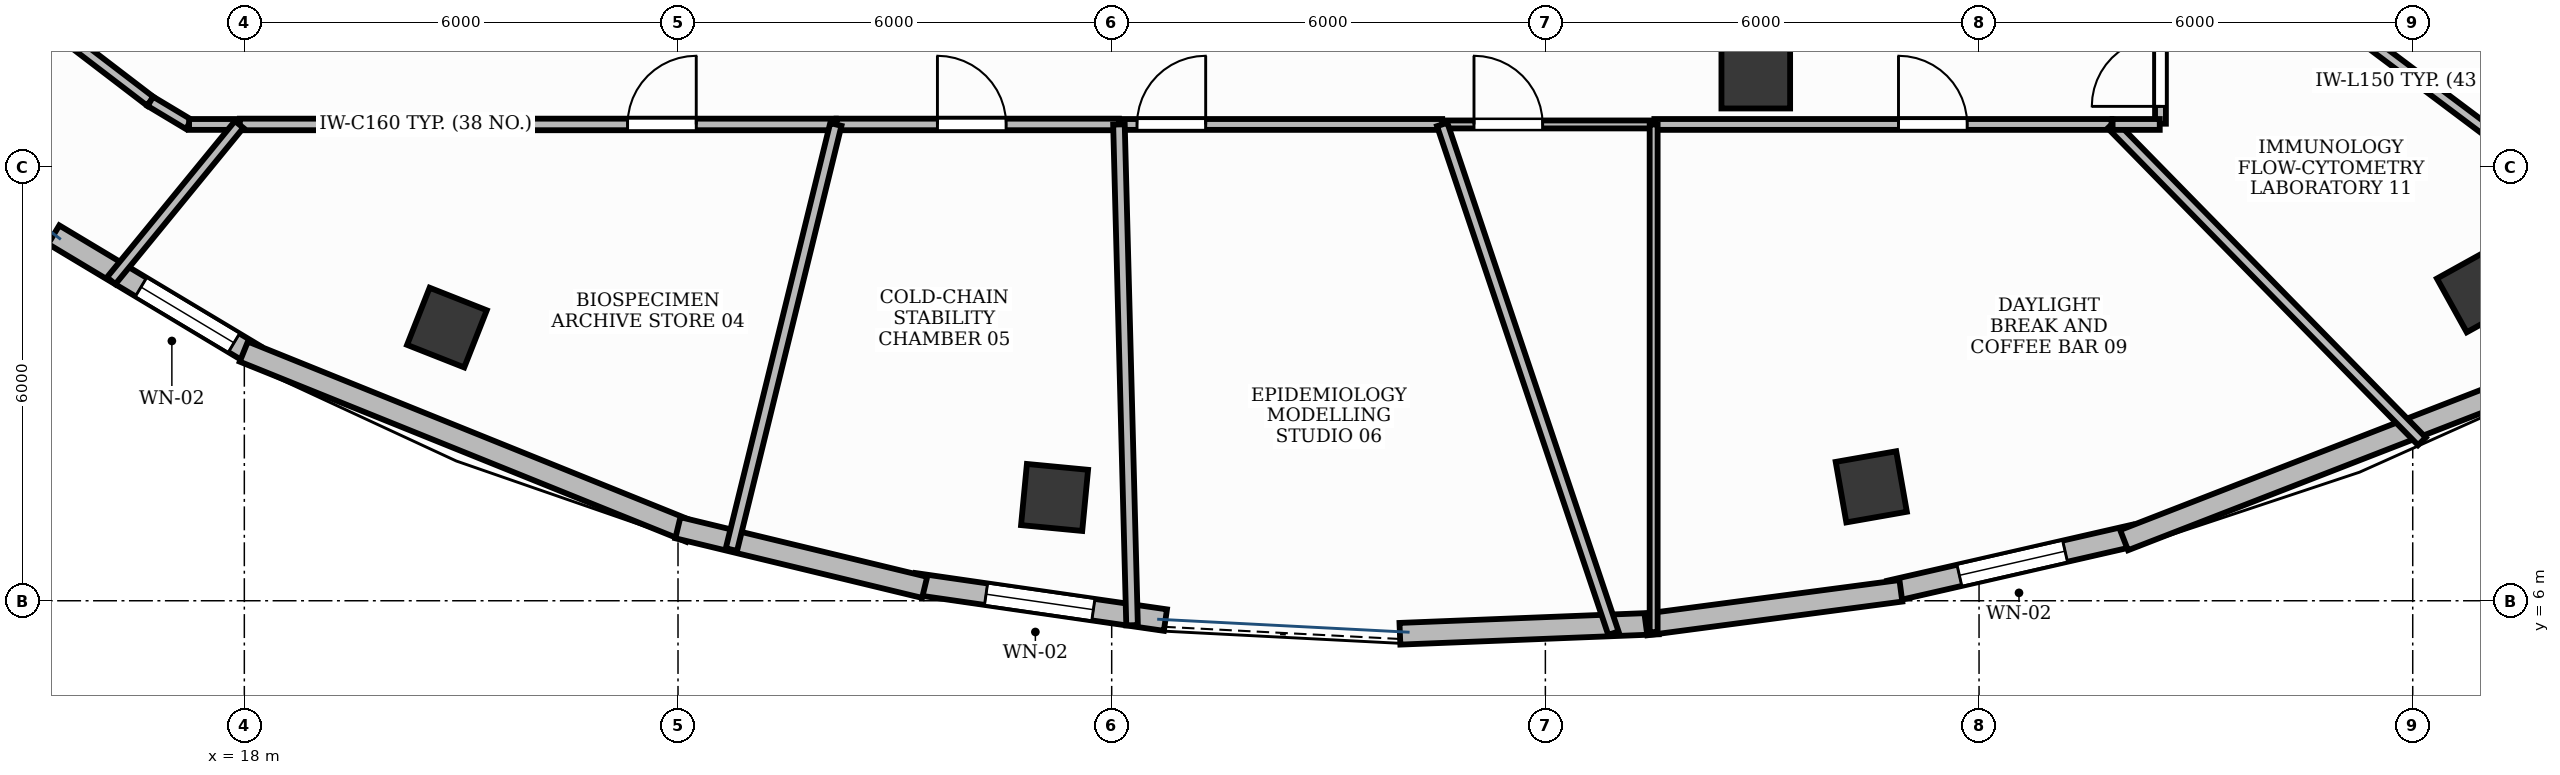
"""IFC4 building model, lengths in metres.
Left out: names, types, materials, properties, quantities, classifications, styles, units other than length and angle.
Written with IfcOpenShell. Run it as: python <this file> out.ifc"""

import sys

from ifc_helpers import new_model, si_unit, direction, frame, frame_2d, origin, origin_2d, place, context, subcontext, project, spatial, rectangle, extrude, element, fill, save


model = new_model("IFC4")
c1 = context("Model", 3, precision=1e-05, world=origin(), true_north=direction((0.0, 1.0)))
c2 = subcontext(c1, "Body", "Model", "MODEL_VIEW")
j1 = project(units=[si_unit("LENGTHUNIT", "METRE"), si_unit("PLANEANGLEUNIT", "RADIAN")], contexts=[c1])
p1 = place(None, origin())
s1 = spatial("IfcSite", under=j1, at=p1, CompositionType="ELEMENT")
p2 = place(p1, origin())
s2 = spatial("IfcBuilding", under=s1, at=p2, CompositionType="ELEMENT")
p3 = place(p2, frame((0.0, 0.0, 252.0)))
s3 = spatial("IfcBuildingStorey", under=s2, at=p3, CompositionType="ELEMENT", Elevation=252.0)
for number, where, z_axis, x_axis in (
    (1, (20.803, 9.78, -0.0), (0.0, 0.0, 1.0), (-0.93, 0.367, 0.0)),
    (2, (29.21, 7.429, -0.0), (0.0, 0.0, 1.0), (-0.995, 0.095, 0.0)),
    (3, (40.509, 7.576, -0.0), (0.0, 0.0, 1.0), (0.985, 0.173, 0.0)),
):
    element("IfcColumn", number, at=place(p3, frame(where, z_axis=z_axis, x_axis=x_axis)), inside=s3, PredefinedType="COLUMN", context=c2, shape_type="SweptSolid", body=[
        extrude(rectangle(XDim=0.85, YDim=0.85, at=origin_2d()), origin(), (0.0, 0.0, 1.0), 3.901),
    ])
p4 = place(p3, frame((38.911, 13.286, -0.0), z_axis=(0.0, 0.0, 1.0), x_axis=(1.0, 0.0, 0.0)))
e4 = element("IfcColumn", 4, at=p4, inside=s3, PredefinedType="COLUMN", context=c2, shape_type="SweptSolid", body=[
    extrude(rectangle(XDim=0.95, YDim=0.95, at=origin_2d()), origin(), (0.0, 0.0, 1.0), 3.901),
])
p5 = place(p3, frame((48.913, 10.292, -0.0), z_axis=(0.0, 0.0, 1.0), x_axis=(0.874535078577, 0.484962262797, 0.0)))
e5 = element("IfcColumn", 5, at=p5, inside=s3, PredefinedType="COLUMN", context=c2, shape_type="SweptSolid", body=[
    extrude(rectangle(XDim=0.85, YDim=0.85, at=origin_2d()), origin(), (0.0, 0.0, 1.0), 3.901),
])
p6 = place(p3, frame((15.363, 11.065, 0.0), z_axis=(0.0, 0.0, 1.0), x_axis=(0.857526080841, -0.514440492844, 0.0)))
e6 = element("IfcWall", 6, at=p6, inside=s3, PredefinedType="STANDARD", context=c2, shape_type="SweptSolid", body=[
    extrude(rectangle(XDim=3.249, YDim=0.3, at=frame_2d((1.624, 0.0))), origin(), (0.0, 0.0, 1.0), 3.9),
])
p7 = place(p6, frame((1.408, 0.0, 0.95)))
e7 = element("IfcOpeningElement", 7, at=p7, cuts=e6, PredefinedType="OPENING", context=c2, shape_type="SweptSolid", body=[
    extrude(rectangle(XDim=1.5, YDim=1.8, at=frame_2d((0.75, 0.9))), frame((0.0, 0.165, 0.0), z_axis=(0.0, -1.0, 0.0), x_axis=(1.0, 0.0, 0.0)), (0.0, 0.0, 1.0), 0.33),
])
p8 = place(p3, frame((27.265, 6.235, 0.0), z_axis=(0.0, 0.0, 1.0), x_axis=(0.989727373885, -0.14296756759, 0.0)))
e8 = element("IfcWall", 8, at=p8, inside=s3, PredefinedType="STANDARD", context=c2, shape_type="SweptSolid", body=[
    extrude(rectangle(XDim=3.514, YDim=0.3, at=frame_2d((1.757, 0.0))), origin(), (0.0, 0.0, 1.0), 3.9),
])
p9 = place(p8, frame((1.007, 0.0, 0.95)))
e9 = element("IfcOpeningElement", 9, at=p9, cuts=e8, PredefinedType="OPENING", context=c2, shape_type="SweptSolid", body=[
    extrude(rectangle(XDim=1.5, YDim=1.8, at=frame_2d((0.75, 0.9))), frame((0.0, 0.165, 0.0), z_axis=(0.0, -1.0, 0.0), x_axis=(1.0, 0.0, 0.0)), (0.0, 0.0, 1.0), 0.33),
])
p10 = place(p3, frame((40.763, 6.131, 0.0), z_axis=(0.0, 0.0, 1.0), x_axis=(0.974814062394, 0.223019155589, 0.0)))
e10 = element("IfcWall", 10, at=p10, inside=s3, PredefinedType="STANDARD", context=c2, shape_type="SweptSolid", body=[
    extrude(rectangle(XDim=3.479, YDim=0.3, at=frame_2d((1.74, 0.0))), origin(), (0.0, 0.0, 1.0), 3.9),
])
p11 = place(p10, frame((0.99, 0.0, 0.95)))
e11 = element("IfcOpeningElement", 11, at=p11, cuts=e10, PredefinedType="OPENING", context=c2, shape_type="SweptSolid", body=[
    extrude(rectangle(XDim=1.5, YDim=1.8, at=frame_2d((0.75, 0.9))), frame((0.0, 0.165, 0.0), z_axis=(0.0, -1.0, 0.0), x_axis=(1.0, 0.0, 0.0)), (0.0, 0.0, 1.0), 0.33),
])
p12 = place(p3, frame((17.993, 9.447, 0.0), z_axis=(0.0, 0.0, 1.0), x_axis=(0.927372969182, -0.374138177725, 0.0)))
e12 = element("IfcWall", 12, at=p12, inside=s3, PredefinedType="STANDARD", context=c2, shape_type="SweptSolid", body=[
    extrude(rectangle(XDim=6.66, YDim=0.3, at=frame_2d((3.33, 0.0))), origin(), (0.0, 0.0, 1.0), 3.47),
])
p13 = place(p3, frame((23.998, 7.01, 0.0), z_axis=(0.0, 0.0, 1.0), x_axis=(0.972025869784, -0.23487381393, 0.0)))
e13 = element("IfcWall", 13, at=p13, inside=s3, PredefinedType="STANDARD", context=c2, shape_type="SweptSolid", body=[
    extrude(rectangle(XDim=3.512, YDim=0.3, at=frame_2d((1.756, 0.0))), origin(), (0.0, 0.0, 1.0), 3.9),
])
p14 = place(p3, frame((33.988, 5.543, 0.0), z_axis=(0.0, 0.0, 1.0), x_axis=(0.999208461954, 0.039780014567, 0.0)))
e14 = element("IfcWall", 14, at=p14, inside=s3, PredefinedType="STANDARD", context=c2, shape_type="SweptSolid", body=[
    extrude(rectangle(XDim=3.578, YDim=0.3, at=frame_2d((1.789, 0.0))), origin(), (0.0, 0.0, 1.0), 3.9),
])
p15 = place(p3, frame((37.391, 5.671, 0.0), z_axis=(0.0, 0.0, 1.0), x_axis=(0.991358046751, 0.131183928672, 0.0)))
e15 = element("IfcWall", 15, at=p15, inside=s3, PredefinedType="STANDARD", context=c2, shape_type="SweptSolid", body=[
    extrude(rectangle(XDim=3.558, YDim=0.3, at=frame_2d((1.779, 0.0))), origin(), (0.0, 0.0, 1.0), 3.9),
])
p16 = place(p3, frame((44.007, 6.839, 0.0), z_axis=(0.0, 0.0, 1.0), x_axis=(0.932143156112, 0.362089956383, 0.0)))
e16 = element("IfcWall", 16, at=p16, inside=s3, PredefinedType="STANDARD", context=c2, shape_type="SweptSolid", body=[
    extrude(rectangle(XDim=6.68, YDim=0.3, at=frame_2d((3.34, 0.0))), origin(), (0.0, 0.0, 1.0), 3.9),
])
p17 = place(p3, frame((17.938, 12.59, 0.0), z_axis=(0.0, 0.0, 1.0), x_axis=(1.0, 0.0, 0.0)))
e17 = element("IfcWall", 17, at=p17, inside=s3, PredefinedType="PARTITIONING", context=c2, shape_type="SweptSolid", body=[
    extrude(rectangle(XDim=8.246, YDim=0.16, at=frame_2d((4.123, 0.0))), origin(), (0.0, 0.0, 1.0), 2.91),
])
p18 = place(p17, frame((5.364, 0.0, 0.0)))
e18 = element("IfcOpeningElement", 18, at=p18, cuts=e17, PredefinedType="OPENING", context=c2, shape_type="SweptSolid", body=[
    extrude(rectangle(XDim=0.95, YDim=2.15, at=frame_2d((0.475, 1.075))), frame((0.0, 0.095, 0.0), z_axis=(0.0, -1.0, 0.0), x_axis=(1.0, 0.0, 0.0)), (0.0, 0.0, 1.0), 0.19),
])
p19 = place(p3, frame((26.194, 12.59, 0.0), z_axis=(0.0, 0.0, 1.0), x_axis=(1.0, 0.0, 0.0)))
e19 = element("IfcWall", 19, at=p19, inside=s3, PredefinedType="PARTITIONING", context=c2, shape_type="SweptSolid", body=[
    extrude(rectangle(XDim=3.907, YDim=0.16, at=frame_2d((1.953, 0.0))), origin(), (0.0, 0.0, 1.0), 2.91),
])
p20 = place(p19, frame((1.396, 0.0, 0.0)))
e20 = element("IfcOpeningElement", 20, at=p20, cuts=e19, PredefinedType="OPENING", context=c2, shape_type="SweptSolid", body=[
    extrude(rectangle(XDim=0.95, YDim=2.15, at=frame_2d((0.475, 1.075))), frame((0.0, 0.095, 0.0), z_axis=(0.0, -1.0, 0.0), x_axis=(1.0, 0.0, 0.0)), (0.0, 0.0, 1.0), 0.19),
])
p21 = place(p3, frame((30.11, 12.59, 0.0), z_axis=(0.0, 0.0, 1.0), x_axis=(1.0, 0.0, 0.0)))
e21 = element("IfcWall", 21, at=p21, inside=s3, PredefinedType="PARTITIONING", context=c2, shape_type="SweptSolid", body=[
    extrude(rectangle(XDim=4.462, YDim=0.15, at=frame_2d((2.231, 0.0))), origin(), (0.0, 0.0, 1.0), 2.91),
])
p22 = place(p21, frame((0.24, 0.0, 0.0)))
e22 = element("IfcOpeningElement", 22, at=p22, cuts=e21, PredefinedType="OPENING", context=c2, shape_type="SweptSolid", body=[
    extrude(rectangle(XDim=0.95, YDim=2.15, at=frame_2d((0.475, 1.075))), frame((0.0, 0.09, 0.0), z_axis=(0.0, -1.0, 0.0), x_axis=(1.0, 0.0, 0.0)), (0.0, 0.0, 1.0), 0.18),
])
p23 = place(p3, frame((34.583, 12.59, 0.0), z_axis=(0.0, 0.0, 1.0), x_axis=(1.0, 0.0, 0.0)))
e23 = element("IfcWall", 23, at=p23, inside=s3, PredefinedType="MOVABLE", context=c2, shape_type="SweptSolid", body=[
    extrude(rectangle(XDim=2.915, YDim=0.11, at=frame_2d((1.458, 0.0))), origin(), (0.0, 0.0, 1.0), 2.91),
])
p24 = place(p23, frame((0.429, 0.0, 0.0)))
e24 = element("IfcOpeningElement", 24, at=p24, cuts=e23, PredefinedType="OPENING", context=c2, shape_type="SweptSolid", body=[
    extrude(rectangle(XDim=0.95, YDim=2.15, at=frame_2d((0.475, 1.075))), frame((0.0, 0.07, 0.0), z_axis=(0.0, -1.0, 0.0), x_axis=(1.0, 0.0, 0.0)), (0.0, 0.0, 1.0), 0.14),
])
p25 = place(p3, frame((37.508, 12.59, 0.0), z_axis=(0.0, 0.0, 1.0), x_axis=(1.0, 0.0, 0.0)))
e25 = element("IfcWall", 25, at=p25, inside=s3, PredefinedType="PARTITIONING", context=c2, shape_type="SweptSolid", body=[
    extrude(rectangle(XDim=6.325, YDim=0.15, at=frame_2d((3.163, 0.0))), origin(), (0.0, 0.0, 1.0), 2.91),
])
p26 = place(p25, frame((3.377, 0.0, 0.0)))
e26 = element("IfcOpeningElement", 26, at=p26, cuts=e25, PredefinedType="OPENING", context=c2, shape_type="SweptSolid", body=[
    extrude(rectangle(XDim=0.95, YDim=2.15, at=frame_2d((0.475, 1.075))), frame((0.0, 0.09, 0.0), z_axis=(0.0, -1.0, 0.0), x_axis=(1.0, 0.0, 0.0)), (0.0, 0.0, 1.0), 0.18),
])
p27 = place(p3, frame((44.51, 12.6, 0.0), z_axis=(0.0, 0.0, 1.0), x_axis=(0.0, 1.0, 0.0)))
e27 = element("IfcWall", 27, at=p27, inside=s3, PredefinedType="PARTITIONING", context=c2, shape_type="SweptSolid", body=[
    extrude(rectangle(XDim=3.297, YDim=0.15, at=frame_2d((1.648, 0.0))), origin(), (0.0, 0.0, 1.0), 2.91),
])
p28 = place(p27, frame((0.24, 0.0, 0.0)))
e28 = element("IfcOpeningElement", 28, at=p28, cuts=e27, PredefinedType="OPENING", context=c2, shape_type="SweptSolid", body=[
    extrude(rectangle(XDim=0.95, YDim=2.15, at=frame_2d((0.475, 1.075))), frame((0.0, 0.09, 0.0), z_axis=(0.0, -1.0, 0.0), x_axis=(1.0, 0.0, 0.0)), (0.0, 0.0, 1.0), 0.18),
])
p29 = place(p3, frame((14.516, 14.58, 0.0), z_axis=(0.0, 0.0, 1.0), x_axis=(0.794390609039, -0.60740724417, 0.0)))
e29 = element("IfcWall", 29, at=p29, inside=s3, PredefinedType="PARTITIONING", context=c2, shape_type="SweptSolid", body=[
    extrude(rectangle(XDim=2.749, YDim=0.15, at=frame_2d((1.374, 0.0))), origin(), (0.0, 0.0, 1.0), 2.91),
])
p30 = place(p3, frame((16.7, 12.91, 0.0), z_axis=(0.0, 0.0, 1.0), x_axis=(0.857458106414, -0.514553783141, 0.0)))
e30 = element("IfcWall", 30, at=p30, inside=s3, PredefinedType="PARTITIONING", context=c2, shape_type="SweptSolid", body=[
    extrude(rectangle(XDim=0.619, YDim=0.15, at=frame_2d((0.309, 0.0))), origin(), (0.0, 0.0, 1.0), 2.91),
])
p31 = place(p3, frame((17.236, 12.59, 0.0), z_axis=(0.0, 0.0, 1.0), x_axis=(1.0, 0.0, 0.0)))
e31 = element("IfcWall", 31, at=p31, inside=s3, PredefinedType="PARTITIONING", context=c2, shape_type="SweptSolid", body=[
    extrude(rectangle(XDim=0.692, YDim=0.15, at=frame_2d((0.346, 0.0))), origin(), (0.0, 0.0, 1.0), 2.91),
])
p32 = place(p3, frame((17.928, 12.59, 0.0), z_axis=(0.0, 0.0, 1.0), x_axis=(-0.633318665549, -0.773891121455, 0.0)))
e32 = element("IfcWall", 32, at=p32, inside=s3, PredefinedType="PARTITIONING", context=c2, shape_type="SweptSolid", body=[
    extrude(rectangle(XDim=2.794, YDim=0.15, at=frame_2d((1.397, 0.0))), origin(), (0.0, 0.0, 1.0), 2.91),
])
p33 = place(p3, frame((26.184, 12.59, 0.0), z_axis=(0.0, 0.0, 1.0), x_axis=(-0.238531404219, -0.971134784261, 0.0)))
e33 = element("IfcWall", 33, at=p33, inside=s3, PredefinedType="PARTITIONING", context=c2, shape_type="SweptSolid", body=[
    extrude(rectangle(XDim=6.057, YDim=0.16, at=frame_2d((3.029, 0.0))), origin(), (0.0, 0.0, 1.0), 2.91),
])
p34 = place(p3, frame((30.1, 12.59, 0.0), z_axis=(0.0, 0.0, 1.0), x_axis=(0.026207563796, -0.999656522812, 0.0)))
e34 = element("IfcWall", 34, at=p34, inside=s3, PredefinedType="PARTITIONING", context=c2, shape_type="SweptSolid", body=[
    extrude(rectangle(XDim=6.931, YDim=0.16, at=frame_2d((3.465, 0.0))), origin(), (0.0, 0.0, 1.0), 2.91),
])
p35 = place(p3, frame((34.573, 12.59, 0.0), z_axis=(0.0, 0.0, 1.0), x_axis=(0.318948473563, -0.947772056568, 0.0)))
e35 = element("IfcWall", 35, at=p35, inside=s3, PredefinedType="PARTITIONING", context=c2, shape_type="SweptSolid", body=[
    extrude(rectangle(XDim=7.427, YDim=0.15, at=frame_2d((3.713, 0.0))), origin(), (0.0, 0.0, 1.0), 2.91),
])
p36 = place(p3, frame((37.498, 12.59, 0.0), z_axis=(0.0, 0.0, 1.0), x_axis=(0.0, -1.0, 0.0)))
e36 = element("IfcWall", 36, at=p36, inside=s3, PredefinedType="MOVABLE", context=c2, shape_type="SweptSolid", body=[
    extrude(rectangle(XDim=7.024, YDim=0.11, at=frame_2d((3.512, 0.0))), origin(), (0.0, 0.0, 1.0), 2.91),
])
p37 = place(p3, frame((43.833, 12.59, 0.0), z_axis=(0.0, 0.0, 1.0), x_axis=(0.699668373954, -0.714467750489, 0.0)))
e37 = element("IfcWall", 37, at=p37, inside=s3, PredefinedType="PARTITIONING", context=c2, shape_type="SweptSolid", body=[
    extrude(rectangle(XDim=6.137, YDim=0.15, at=frame_2d((3.068, 0.0))), origin(), (0.0, 0.0, 1.0), 2.91),
])
p38 = place(p3, frame((43.848, 12.59, 0.0), z_axis=(0.0, 0.0, 1.0), x_axis=(1.0, 0.0, 0.0)))
e38 = element("IfcWall", 38, at=p38, inside=s3, PredefinedType="PARTITIONING", context=c2, shape_type="SweptSolid", body=[
    extrude(rectangle(XDim=0.652, YDim=0.15, at=frame_2d((0.326, 0.0))), origin(), (0.0, 0.0, 1.0), 2.91),
])
p39 = place(p3, frame((44.51, 15.897, 0.0), z_axis=(0.0, 0.0, 1.0), x_axis=(0.79968453469, -0.600420390209, 0.0)))
e39 = element("IfcWall", 39, at=p39, inside=s3, PredefinedType="PARTITIONING", context=c2, shape_type="SweptSolid", body=[
    extrude(rectangle(XDim=9.011, YDim=0.15, at=frame_2d((4.506, 0.0))), origin(), (0.0, 0.0, 1.0), 2.91),
])
p40 = place(p7, origin())
e40 = element("IfcWindow", 40, at=p40, inside=s3, PartitioningType="DOUBLE_PANEL_VERTICAL", PredefinedType="WINDOW", context=c2, shape_type="SweptSolid", body=[
    extrude(rectangle(XDim=1.5, YDim=1.8, at=frame_2d((0.75, 0.9))), frame((0.0, 0.03, 0.0), z_axis=(0.0, -1.0, 0.0), x_axis=(1.0, 0.0, 0.0)), (0.0, 0.0, 1.0), 0.06),
])
fill(e7, e40)
p41 = place(p9, origin())
e41 = element("IfcWindow", 41, at=p41, inside=s3, PartitioningType="DOUBLE_PANEL_VERTICAL", PredefinedType="WINDOW", context=c2, shape_type="SweptSolid", body=[
    extrude(rectangle(XDim=1.5, YDim=1.8, at=frame_2d((0.75, 0.9))), frame((0.0, 0.03, 0.0), z_axis=(0.0, -1.0, 0.0), x_axis=(1.0, 0.0, 0.0)), (0.0, 0.0, 1.0), 0.06),
])
fill(e9, e41)
p42 = place(p11, origin())
e42 = element("IfcWindow", 42, at=p42, inside=s3, PartitioningType="DOUBLE_PANEL_VERTICAL", PredefinedType="WINDOW", context=c2, shape_type="SweptSolid", body=[
    extrude(rectangle(XDim=1.5, YDim=1.8, at=frame_2d((0.75, 0.9))), frame((0.0, 0.03, 0.0), z_axis=(0.0, -1.0, 0.0), x_axis=(1.0, 0.0, 0.0)), (0.0, 0.0, 1.0), 0.06),
])
fill(e11, e42)
p43 = place(p18, origin())
e43 = element("IfcDoor", 43, at=p43, inside=s3, OperationType="SINGLE_SWING_RIGHT", PredefinedType="DOOR", context=c2, shape_type="SweptSolid", body=[
    extrude(rectangle(XDim=0.95, YDim=2.15, at=frame_2d((0.475, 1.075))), frame((0.0, 0.025, 0.0), z_axis=(0.0, -1.0, 0.0), x_axis=(1.0, 0.0, 0.0)), (0.0, 0.0, 1.0), 0.05),
])
fill(e18, e43)
p44 = place(p20, origin())
e44 = element("IfcDoor", 44, at=p44, inside=s3, OperationType="SINGLE_SWING_LEFT", PredefinedType="DOOR", context=c2, shape_type="SweptSolid", body=[
    extrude(rectangle(XDim=0.95, YDim=2.15, at=frame_2d((0.475, 1.075))), frame((0.0, 0.025, 0.0), z_axis=(0.0, -1.0, 0.0), x_axis=(1.0, 0.0, 0.0)), (0.0, 0.0, 1.0), 0.05),
])
fill(e20, e44)
p45 = place(p22, origin())
e45 = element("IfcDoor", 45, at=p45, inside=s3, OperationType="SINGLE_SWING_RIGHT", PredefinedType="DOOR", context=c2, shape_type="SweptSolid", body=[
    extrude(rectangle(XDim=0.95, YDim=2.15, at=frame_2d((0.475, 1.075))), frame((0.0, 0.025, 0.0), z_axis=(0.0, -1.0, 0.0), x_axis=(1.0, 0.0, 0.0)), (0.0, 0.0, 1.0), 0.05),
])
fill(e22, e45)
p46 = place(p24, origin())
e46 = element("IfcDoor", 46, at=p46, inside=s3, OperationType="SINGLE_SWING_LEFT", PredefinedType="DOOR", context=c2, shape_type="SweptSolid", body=[
    extrude(rectangle(XDim=0.95, YDim=2.15, at=frame_2d((0.475, 1.075))), frame((0.0, 0.025, 0.0), z_axis=(0.0, -1.0, 0.0), x_axis=(1.0, 0.0, 0.0)), (0.0, 0.0, 1.0), 0.05),
])
fill(e24, e46)
p47 = place(p26, origin())
e47 = element("IfcDoor", 47, at=p47, inside=s3, OperationType="SINGLE_SWING_LEFT", PredefinedType="DOOR", context=c2, shape_type="SweptSolid", body=[
    extrude(rectangle(XDim=0.95, YDim=2.15, at=frame_2d((0.475, 1.075))), frame((0.0, 0.025, 0.0), z_axis=(0.0, -1.0, 0.0), x_axis=(1.0, 0.0, 0.0)), (0.0, 0.0, 1.0), 0.05),
])
fill(e26, e47)
p48 = place(p28, origin())
e48 = element("IfcDoor", 48, at=p48, inside=s3, OperationType="SINGLE_SWING_LEFT", PredefinedType="DOOR", context=c2, shape_type="SweptSolid", body=[
    extrude(rectangle(XDim=0.95, YDim=2.15, at=frame_2d((0.475, 1.075))), frame((0.0, 0.025, 0.0), z_axis=(0.0, -1.0, 0.0), x_axis=(1.0, 0.0, 0.0)), (0.0, 0.0, 1.0), 0.05),
])
fill(e28, e48)
save(model, sys.argv[1])
